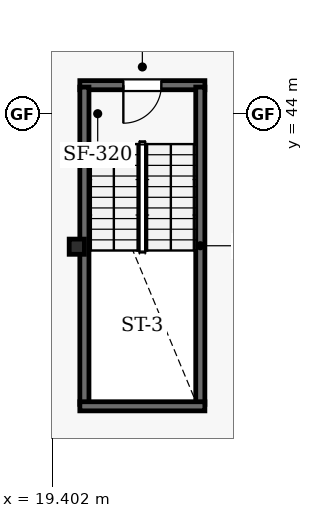
"""IFC4 building model, lengths in metres.
Left out: names, types, materials, properties, quantities, classifications, styles, units other than length and angle.
Written with IfcOpenShell. Run it as: python <this file> out.ifc"""

import sys

from ifc_helpers import new_model, si_unit, direction, frame, frame_2d, origin, origin_2d, place, context, subcontext, project, spatial, rectangle, i_section, extrude, element, fill, save


model = new_model("IFC4")
c1 = context("Model", 3, precision=1e-05, world=origin(), true_north=direction((0.0, 1.0)))
c2 = subcontext(c1, "Body", "Model", "MODEL_VIEW")
j1 = project(units=[si_unit("LENGTHUNIT", "METRE"), si_unit("PLANEANGLEUNIT", "RADIAN")], contexts=[c1])
p1 = place(None, origin())
s1 = spatial("IfcSite", under=j1, at=p1, CompositionType="ELEMENT")
p2 = place(p1, origin())
s2 = spatial("IfcBuilding", under=s1, at=p2, CompositionType="ELEMENT")
p3 = place(p2, frame((0.0, 0.0, -11.7)))
s3 = spatial("IfcBuildingStorey", under=s2, at=p3, CompositionType="ELEMENT", Elevation=-11.7)
p4 = place(p3, frame((20.05, 40.5, 0.0), z_axis=(0.0, 0.0, 1.0), x_axis=(1.0, 0.0, 0.0)))
e1 = element("IfcColumn", 1, at=p4, inside=s3, PredefinedType="PILASTER", context=c2, shape_type="SweptSolid", body=[
    extrude(i_section(OverallWidth=0.4, OverallDepth=0.4, WebThickness=0.013, FlangeThickness=0.021, FilletRadius=0.022, at=origin_2d()), origin(), (0.0, 0.0, 1.0), 3.9),
])
p5 = place(p3, frame((20.13, 44.75, 0.0), z_axis=(0.0, 0.0, 1.0), x_axis=(1.0, 0.0, 0.0)))
e2 = element("IfcWall", 2, at=p5, inside=s3, PredefinedType="SHEAR", context=c2, shape_type="SweptSolid", body=[
    extrude(rectangle(XDim=3.29, YDim=0.24, at=frame_2d((1.645, 0.0))), origin(), (0.0, 0.0, 1.0), 3.58),
])
p6 = place(p5, frame((1.145, 0.0, 0.0)))
e3 = element("IfcOpeningElement", 3, at=p6, cuts=e2, PredefinedType="OPENING", context=c2, shape_type="SweptSolid", body=[
    extrude(rectangle(XDim=1.0, YDim=2.15, at=frame_2d((0.5, 1.075))), frame((0.0, 0.13, 0.0), z_axis=(0.0, -1.0, 0.0), x_axis=(1.0, 0.0, 0.0)), (0.0, 0.0, 1.0), 0.26),
])
for number, where, z_axis, x_axis in (
    (4, (20.25, 36.35, 0.0), (0.0, 0.0, 1.0), (0.0, 1.0, 0.0)),
    (5, (23.3, 36.35, 0.0), (0.0, 0.0, 1.0), (0.0, 1.0, 0.0)),
):
    element("IfcWall", number, at=place(p3, frame(where, z_axis=z_axis, x_axis=x_axis)), inside=s3, PredefinedType="SHEAR", context=c2, shape_type="SweptSolid", body=[
        extrude(rectangle(XDim=8.35, YDim=0.24, at=frame_2d((4.175, 0.0))), origin(), (0.0, 0.0, 1.0), 3.58),
    ])
p7 = place(p3, frame((20.13, 36.3, 0.0), z_axis=(0.0, 0.0, 1.0), x_axis=(1.0, 0.0, 0.0)))
e6 = element("IfcWall", 6, at=p7, inside=s3, PredefinedType="SHEAR", context=c2, shape_type="SweptSolid", body=[
    extrude(rectangle(XDim=3.29, YDim=0.24, at=frame_2d((1.645, 0.0))), origin(), (0.0, 0.0, 1.0), 3.58),
])
p8 = place(p6, frame((1.0, 0.0, 0.0), z_axis=(0.0, 0.0, 1.0), x_axis=(-1.0, 0.0, 0.0)))
e7 = element("IfcDoor", 7, at=p8, inside=s3, OperationType="SINGLE_SWING_LEFT", PredefinedType="DOOR", context=c2, shape_type="SweptSolid", body=[
    extrude(rectangle(XDim=1.0, YDim=2.15, at=frame_2d((0.5, 1.075))), frame((0.0, 0.025, 0.0), z_axis=(0.0, -1.0, 0.0), x_axis=(1.0, 0.0, 0.0)), (0.0, 0.0, 1.0), 0.05),
])
fill(e3, e7)
save(model, sys.argv[1])
